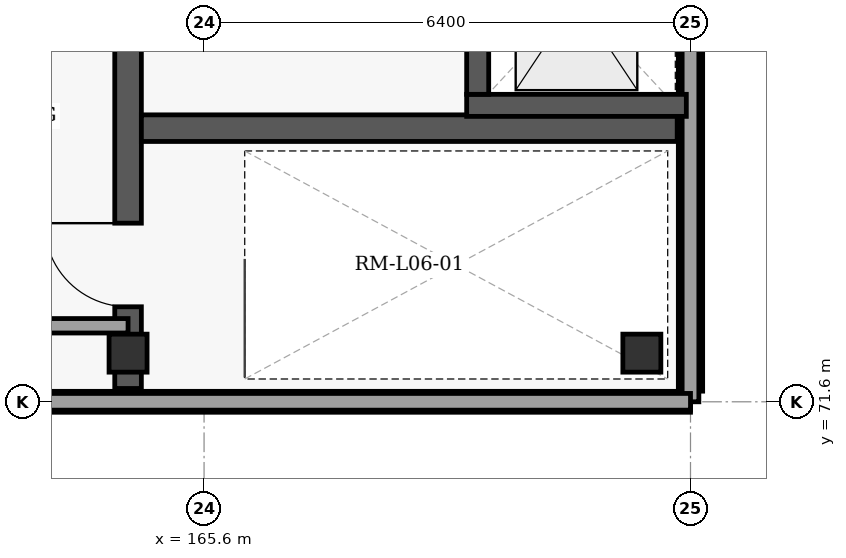
"""IFC4 building model, lengths in metres.
Left out: names, types, materials, properties, quantities, classifications, styles, units other than length and angle.
Written with IfcOpenShell. Run it as: python <this file> out.ifc"""

import sys

from ifc_helpers import new_model, si_unit, direction, frame, frame_2d, origin, origin_2d, place, context, subcontext, project, spatial, rectangle, extrude, element, fill, save


model = new_model("IFC4")
c1 = context("Model", 3, precision=1e-05, world=origin(), true_north=direction((0.0, 1.0)))
c2 = subcontext(c1, "Body", "Model", "MODEL_VIEW")
j1 = project(units=[si_unit("LENGTHUNIT", "METRE"), si_unit("PLANEANGLEUNIT", "RADIAN")], contexts=[c1])
p1 = place(None, origin())
s1 = spatial("IfcSite", under=j1, at=p1, CompositionType="ELEMENT")
p2 = place(p1, origin())
s2 = spatial("IfcBuilding", under=s1, at=p2, CompositionType="ELEMENT")
p3 = place(p2, frame((0.0, 0.0, 29.4)))
s3 = spatial("IfcBuildingStorey", under=s2, at=p3, CompositionType="ELEMENT", Elevation=29.4)
for number, where, z_axis, x_axis in (
    (1, (164.6, 72.24, 0.0), (0.0, 0.0, 1.0), (1.0, 0.0, 0.0)),
    (2, (171.36, 72.24, 0.0), (0.0, 0.0, 1.0), (1.0, 0.0, 0.0)),
):
    element("IfcColumn", number, at=place(p3, frame(where, z_axis=z_axis, x_axis=x_axis)), inside=s3, PredefinedType="COLUMN", context=c2, shape_type="SweptSolid", body=[
        extrude(rectangle(XDim=0.5, YDim=0.5, at=origin_2d()), origin(), (0.0, 0.0, 1.0), 4.5),
    ])
p4 = place(p3, frame((172.0, 117.86, 0.0), z_axis=(0.0, 0.0, 1.0), x_axis=(0.0, -1.0, 0.0)))
e3 = element("IfcWall", 3, at=p4, inside=s3, PredefinedType="SOLIDWALL", context=c2, shape_type="SweptSolid", body=[
    extrude(rectangle(XDim=46.12, YDim=0.32, at=frame_2d((23.06, 0.0))), origin(), (0.0, 0.0, 1.0), 4.255),
])
p5 = place(p3, frame((172.0, 71.6, 0.0), z_axis=(0.0, 0.0, 1.0), x_axis=(-1.0, 0.0, 0.0)))
e4 = element("IfcWall", 4, at=p5, inside=s3, PredefinedType="SOLIDWALL", context=c2, shape_type="SweptSolid", body=[
    extrude(rectangle(XDim=19.2, YDim=0.275, at=frame_2d((9.6, 0.0))), origin(), (0.0, 0.0, 1.0), 4.255),
])
p6 = place(p5, frame((10.0, 0.0, 0.8)))
e5 = element("IfcOpeningElement", 5, at=p6, cuts=e4, PredefinedType="OPENING", context=c2, shape_type="SweptSolid", body=[
    extrude(rectangle(XDim=3.35, YDim=2.9, at=frame_2d((1.675, 1.45))), frame((0.0, 0.147, 0.0), z_axis=(0.0, -1.0, 0.0), x_axis=(1.0, 0.0, 0.0)), (0.0, 0.0, 1.0), 0.295),
])
p7 = place(p3, frame((172.0, 118.0, 4.5), z_axis=(0.0, 0.0, 1.0), x_axis=(0.0, -1.0, 0.0)))
e6 = element("IfcWall", 6, at=p7, inside=s3, PredefinedType="PARAPET", context=c2, shape_type="SweptSolid", body=[
    extrude(rectangle(XDim=46.4, YDim=0.22, at=frame_2d((23.2, 0.0))), origin(), (0.0, 0.0, 1.0), 0.95),
])
p8 = place(p3, frame((172.0, 71.6, 4.5), z_axis=(0.0, 0.0, 1.0), x_axis=(-1.0, 0.0, 0.0)))
e7 = element("IfcWall", 7, at=p8, inside=s3, PredefinedType="PARAPET", context=c2, shape_type="SweptSolid", body=[
    extrude(rectangle(XDim=19.2, YDim=0.22, at=frame_2d((9.6, 0.0))), origin(), (0.0, 0.0, 1.0), 0.95),
])
p9 = place(p3, frame((164.6, 71.775, 0.0), z_axis=(0.0, 0.0, 1.0), x_axis=(0.0, 1.0, 0.0)))
e8 = element("IfcWall", 8, at=p9, inside=s3, PredefinedType="SHEAR", context=c2, shape_type="SweptSolid", body=[
    extrude(rectangle(XDim=7.573, YDim=0.35, at=frame_2d((3.787, 0.0))), origin(), (0.0, 0.0, 1.0), 4.255),
])
p10 = place(p9, frame((1.075, 0.0, 0.0)))
e9 = element("IfcOpeningElement", 9, at=p10, cuts=e8, PredefinedType="OPENING", context=c2, shape_type="SweptSolid", body=[
    extrude(rectangle(XDim=1.1, YDim=2.15, at=frame_2d((0.55, 1.075))), frame((0.0, 0.185, 0.0), z_axis=(0.0, -1.0, 0.0), x_axis=(1.0, 0.0, 0.0)), (0.0, 0.0, 1.0), 0.37),
])
p11 = place(p9, frame((5.05, 0.0, 0.0)))
e10 = element("IfcOpeningElement", 10, at=p11, cuts=e8, PredefinedType="OPENING", context=c2, shape_type="SweptSolid", body=[
    extrude(rectangle(XDim=1.15, YDim=2.2, at=frame_2d((0.575, 1.1))), frame((0.0, 0.185, 0.0), z_axis=(0.0, -1.0, 0.0), x_axis=(1.0, 0.0, 0.0)), (0.0, 0.0, 1.0), 0.37),
])
p12 = place(p3, frame((164.775, 75.2, 0.0), z_axis=(0.0, 0.0, 1.0), x_axis=(1.0, 0.0, 0.0)))
e11 = element("IfcWall", 11, at=p12, inside=s3, PredefinedType="SHEAR", context=c2, shape_type="SweptSolid", body=[
    extrude(rectangle(XDim=7.05, YDim=0.35, at=frame_2d((3.525, 0.0))), origin(), (0.0, 0.0, 1.0), 4.255),
])
p13 = place(p3, frame((169.055, 75.5, 0.0), z_axis=(0.0, 0.0, 1.0), x_axis=(1.0, 0.0, 0.0)))
e12 = element("IfcWall", 12, at=p13, inside=s3, PredefinedType="SHEAR", context=c2, shape_type="SweptSolid", body=[
    extrude(rectangle(XDim=2.89, YDim=0.29, at=frame_2d((1.445, 0.0))), origin(), (0.0, 0.0, 1.0), 4.255),
])
p14 = place(p3, frame((169.2, 75.645, 0.0), z_axis=(0.0, 0.0, 1.0), x_axis=(0.0, 1.0, 0.0)))
e13 = element("IfcWall", 13, at=p14, inside=s3, PredefinedType="SHEAR", context=c2, shape_type="SweptSolid", body=[
    extrude(rectangle(XDim=2.51, YDim=0.29, at=frame_2d((1.255, 0.0))), origin(), (0.0, 0.0, 1.0), 4.255),
])
p15 = place(p14, frame((0.705, 0.0, 0.0)))
e14 = element("IfcOpeningElement", 14, at=p15, cuts=e13, PredefinedType="OPENING", context=c2, shape_type="SweptSolid", body=[
    extrude(rectangle(XDim=1.1, YDim=2.15, at=frame_2d((0.55, 1.075))), frame((0.0, 0.155, 0.0), z_axis=(0.0, -1.0, 0.0), x_axis=(1.0, 0.0, 0.0)), (0.0, 0.0, 1.0), 0.31),
])
p16 = place(p3, frame((160.105, 72.6, 0.0), z_axis=(0.0, 0.0, 1.0), x_axis=(1.0, 0.0, 0.0)))
e15 = element("IfcWall", 15, at=p16, inside=s3, PredefinedType="PARTITIONING", context=c2, shape_type="SweptSolid", body=[
    extrude(rectangle(XDim=4.495, YDim=0.19, at=frame_2d((2.248, 0.0))), origin(), (0.0, 0.0, 1.0), 3.605),
])
p17 = place(p10, origin())
e16 = element("IfcDoor", 16, at=p17, inside=s3, OperationType="SINGLE_SWING_RIGHT", PredefinedType="DOOR", context=c2, shape_type="SweptSolid", body=[
    extrude(rectangle(XDim=1.1, YDim=2.15, at=frame_2d((0.55, 1.075))), frame((0.0, 0.025, 0.0), z_axis=(0.0, -1.0, 0.0), x_axis=(1.0, 0.0, 0.0)), (0.0, 0.0, 1.0), 0.05),
])
fill(e9, e16)
save(model, sys.argv[1])
